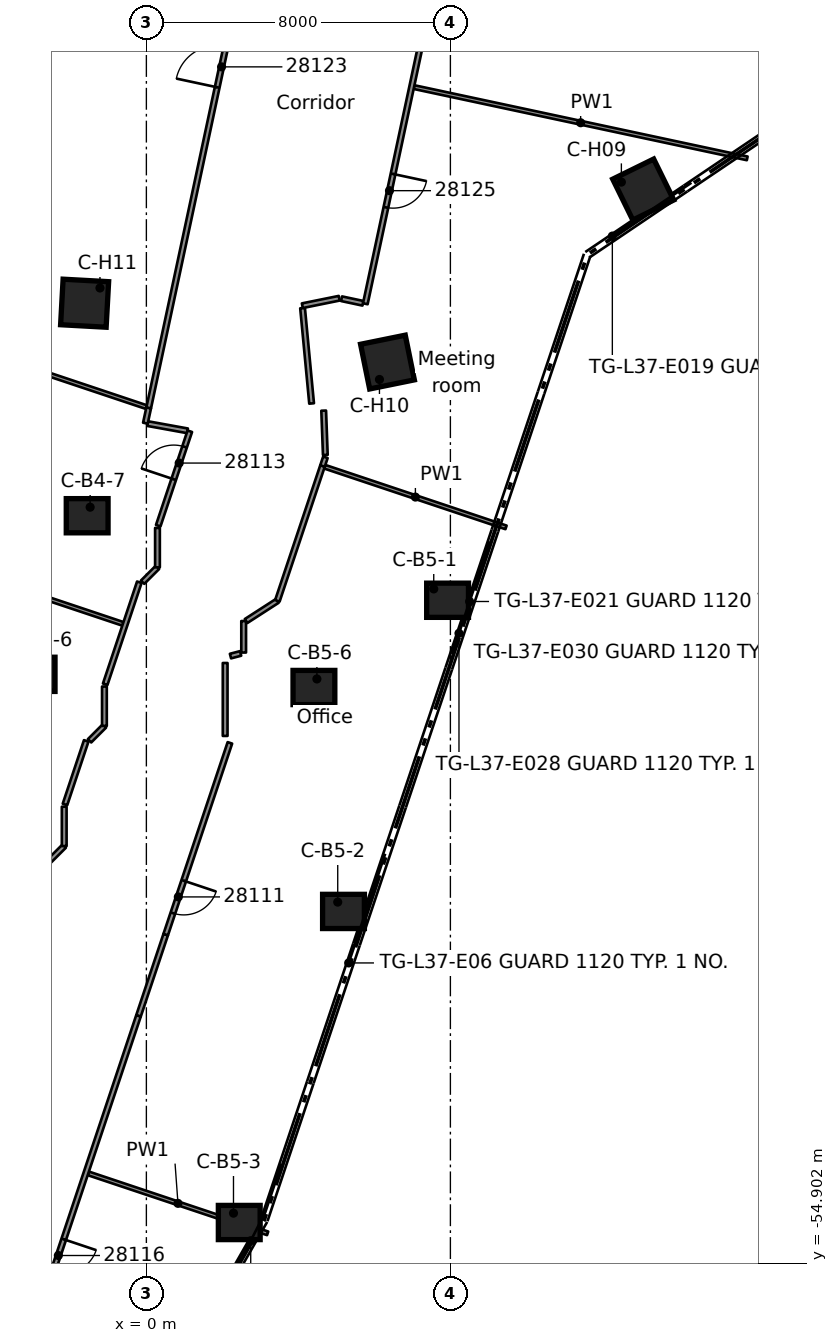
"""IFC4 building model, lengths in metres.
Left out: names, types, materials, properties, quantities, classifications, styles, units other than length and angle.
Written with IfcOpenShell. Run it as: python <this file> out.ifc"""

import sys

from ifc_helpers import new_model, si_unit, direction, frame, frame_2d, origin, origin_2d, place, context, subcontext, project, spatial, rectangle, extrude, element, fill, save


model = new_model("IFC4")
c1 = context("Model", 3, precision=1e-05, world=origin(), true_north=direction((0.0, 1.0)))
c2 = subcontext(c1, "Body", "Model", "MODEL_VIEW")
j1 = project(units=[si_unit("LENGTHUNIT", "METRE"), si_unit("PLANEANGLEUNIT", "RADIAN")], contexts=[c1])
p1 = place(None, origin())
s1 = spatial("IfcSite", under=j1, at=p1, CompositionType="ELEMENT")
p2 = place(p1, origin())
s2 = spatial("IfcBuilding", under=s1, at=p2, CompositionType="ELEMENT")
p3 = place(p2, frame((0.0, 0.0, 145.6)))
s3 = spatial("IfcBuildingStorey", under=s2, at=p3, CompositionType="ELEMENT", Elevation=145.6)
for number, where, z_axis, x_axis in (
    (1, (-2.954, -39.399, 0.0), (0.0, 0.0, 1.0), (1.0, 0.0, 0.0)),
    (2, (-1.558, -35.226, 0.0), (0.0, 0.0, 1.0), (1.0, 0.0, 0.0)),
    (3, (7.926, -37.45, 0.0), (0.0, 0.0, 1.0), (1.0, 0.0, 0.0)),
    (4, (5.187, -45.638, 0.0), (0.0, 0.0, 1.0), (1.0, 0.0, 0.0)),
    (5, (2.444, -53.823, 0.0), (0.0, 0.0, 1.0), (1.0, 0.0, 0.0)),
    (6, (4.409, -39.746, 0.0), (0.0, 0.0, 1.0), (1.0, 0.0, 0.0)),
):
    element("IfcColumn", number, at=place(p3, frame(where, z_axis=z_axis, x_axis=x_axis)), inside=s3, PredefinedType="COLUMN", context=c2, shape_type="SweptSolid", body=[
        extrude(rectangle(XDim=1.1, YDim=0.9, at=origin_2d()), origin(), (0.0, 0.0, 1.0), 3.5),
    ])
for number, where, z_axis, x_axis in (
    (7, (13.075, -26.644, 0.0), (0.0, 0.0, 1.0), (0.441, -0.898, 0.0)),
    (8, (6.344, -31.183, 0.0), (0.0, 0.0, 1.0), (0.199, -0.98, 0.0)),
    (9, (-1.625, -29.634, 0.0), (0.0, 0.0, 1.0), (-0.055, -0.998, 0.0)),
):
    element("IfcColumn", number, at=place(p3, frame(where, z_axis=z_axis, x_axis=x_axis)), inside=s3, PredefinedType="COLUMN", context=c2, shape_type="SweptSolid", body=[
        extrude(rectangle(XDim=1.2, YDim=1.2, at=origin_2d()), origin(), (0.0, 0.0, 1.0), 3.5),
    ])
p4 = place(p3, frame((4.11, -29.762, 0.0), z_axis=(0.0, 0.0, 1.0), x_axis=(0.094315557951, -0.995542352453, 0.0)))
e10 = element("IfcWall", 10, at=p4, inside=s3, PredefinedType="PARTITIONING", context=c2, shape_type="SweptSolid", body=[
    extrude(rectangle(XDim=2.521, YDim=0.125, at=frame_2d((1.261, 0.0))), origin(), (0.0, 0.0, 1.0), 3.08),
])
p5 = place(p3, frame((4.666, -32.461, 0.0), z_axis=(0.0, 0.0, 1.0), x_axis=(0.03682592513, -0.999321695571, 0.0)))
e11 = element("IfcWall", 11, at=p5, inside=s3, PredefinedType="PARTITIONING", context=c2, shape_type="SweptSolid", body=[
    extrude(rectangle(XDim=1.167, YDim=0.125, at=frame_2d((0.583, 0.0))), origin(), (0.0, 0.0, 1.0), 3.08),
])
p6 = place(p3, frame((-1.528, -52.53, 0.0), z_axis=(0.0, 0.0, 1.0), x_axis=(0.948388493502, -0.317110809328, 0.0)))
e12 = element("IfcWall", 12, at=p6, inside=s3, PredefinedType="PARTITIONING", context=c2, shape_type="SweptSolid", body=[
    extrude(rectangle(XDim=4.976, YDim=0.1, at=frame_2d((2.488, 0.0))), origin(), (0.0, 0.0, 1.0), 3.08),
])
p7 = place(p3, frame((-23.366, -30.46, 0.0), z_axis=(0.0, 0.0, 1.0), x_axis=(0.948327494049, -0.317293183083, 0.0)))
e13 = element("IfcWall", 13, at=p7, inside=s3, PredefinedType="PARTITIONING", context=c2, shape_type="SweptSolid", body=[
    extrude(rectangle(XDim=23.988, YDim=0.1, at=frame_2d((11.994, 0.0))), origin(), (0.0, 0.0, 1.0), 3.08),
])
p8 = place(p3, frame((-21.269, -25.25, 0.0), z_axis=(0.0, 0.0, 1.0), x_axis=(0.948309286751, -0.31734759596, 0.0)))
e14 = element("IfcWall", 14, at=p8, inside=s3, PredefinedType="PARTITIONING", context=c2, shape_type="SweptSolid", body=[
    extrude(rectangle(XDim=22.429, YDim=0.1, at=frame_2d((11.215, 0.0))), origin(), (0.0, 0.0, 1.0), 3.08),
])
p9 = place(p3, frame((4.694, -33.937, 0.0), z_axis=(0.0, 0.0, 1.0), x_axis=(0.948328377773, -0.317290541791, 0.0)))
e15 = element("IfcWall", 15, at=p9, inside=s3, PredefinedType="PARTITIONING", context=c2, shape_type="SweptSolid", body=[
    extrude(rectangle(XDim=5.03, YDim=0.1, at=frame_2d((2.515, 0.0))), origin(), (0.0, 0.0, 1.0), 3.08),
])
p10 = place(p3, frame((7.044, -23.948, 0.0), z_axis=(0.0, 0.0, 1.0), x_axis=(0.977886023379, -0.209138531316, 0.0)))
e16 = element("IfcWall", 16, at=p10, inside=s3, PredefinedType="PARTITIONING", context=c2, shape_type="SweptSolid", body=[
    extrude(rectangle(XDim=8.965, YDim=0.1, at=frame_2d((4.483, 0.0))), origin(), (0.0, 0.0, 1.0), 3.08),
])
p11 = place(p3, frame((5.136, -29.516, 0.0), z_axis=(0.0, 0.0, 1.0), x_axis=(0.978074690438, -0.208254411537, 0.0)))
e17 = element("IfcWall", 17, at=p11, inside=s3, PredefinedType="PARTITIONING", context=c2, shape_type="SweptSolid", body=[
    extrude(rectangle(XDim=0.576, YDim=0.125, at=frame_2d((0.288, 0.0))), origin(), (0.0, 0.0, 1.0), 3.08),
])
p12 = place(p3, frame((0.035, -32.802, 0.0), z_axis=(0.0, 0.0, 1.0), x_axis=(0.983943238731, -0.178481659998, 0.0)))
e18 = element("IfcWall", 18, at=p12, inside=s3, PredefinedType="PARTITIONING", context=c2, shape_type="SweptSolid", body=[
    extrude(rectangle(XDim=1.064, YDim=0.125, at=frame_2d((0.532, 0.0))), origin(), (0.0, 0.0, 1.0), 3.08),
])
for number, where, z_axis, x_axis in (
    (19, (-2.553, -44.309, 0.0), (0.0, 0.0, 1.0), (0.707, 0.707, 0.0)),
    (20, (-1.495, -41.148, 0.0), (0.0, 0.0, 1.0), (0.707, 0.707, 0.0)),
):
    element("IfcWall", number, at=place(p3, frame(where, z_axis=z_axis, x_axis=x_axis)), inside=s3, PredefinedType="PARTITIONING", context=c2, shape_type="SweptSolid", body=[
        extrude(rectangle(XDim=0.553, YDim=0.125, at=frame_2d((0.276, 0.0))), origin(), (0.0, 0.0, 1.0), 3.08),
    ])
p13 = place(p3, frame((2.623, -37.997, 0.0), z_axis=(0.0, 0.0, 1.0), x_axis=(0.840117362628, 0.542404661679, 0.0)))
e21 = element("IfcWall", 21, at=p13, inside=s3, PredefinedType="PARTITIONING", context=c2, shape_type="SweptSolid", body=[
    extrude(rectangle(XDim=0.981, YDim=0.125, at=frame_2d((0.49, 0.0))), origin(), (0.0, 0.0, 1.0), 3.08),
])
p14 = place(p3, frame((-0.099, -36.975, 0.0), z_axis=(0.0, 0.0, 1.0), x_axis=(0.707106781187, 0.707106781187, 0.0)))
e22 = element("IfcWall", 22, at=p14, inside=s3, PredefinedType="PARTITIONING", context=c2, shape_type="SweptSolid", body=[
    extrude(rectangle(XDim=0.553, YDim=0.125, at=frame_2d((0.277, 0.0))), origin(), (0.0, 0.0, 1.0), 3.08),
])
p15 = place(p3, frame((4.104, -29.7, 0.0), z_axis=(0.0, 0.0, 1.0), x_axis=(0.980027109115, 0.198863936901, 0.0)))
e23 = element("IfcWall", 23, at=p15, inside=s3, PredefinedType="PARTITIONING", context=c2, shape_type="SweptSolid", body=[
    extrude(rectangle(XDim=0.991, YDim=0.125, at=frame_2d((0.495, 0.0))), origin(), (0.0, 0.0, 1.0), 3.08),
])
p16 = place(p3, frame((2.213, -38.919, 0.0), z_axis=(0.0, 0.0, 1.0), x_axis=(0.967485661633, 0.252925867666, 0.0)))
e24 = element("IfcWall", 24, at=p16, inside=s3, PredefinedType="PARTITIONING", context=c2, shape_type="SweptSolid", body=[
    extrude(rectangle(XDim=0.276, YDim=0.125, at=frame_2d((0.138, 0.0))), origin(), (0.0, 0.0, 1.0), 3.08),
])
p17 = place(p3, frame((-0.207, -48.385, 0.0), z_axis=(0.0, 0.0, 1.0), x_axis=(0.317591795151, 0.948227531584, 0.0)))
e25 = element("IfcWall", 25, at=p17, inside=s3, PredefinedType="PARTITIONING", context=c2, shape_type="SweptSolid", body=[
    extrude(rectangle(XDim=2.255, YDim=0.125, at=frame_2d((1.127, 0.0))), origin(), (0.0, 0.0, 1.0), 3.08),
])
p18 = place(p3, frame((3.447, -37.465, 0.0), z_axis=(0.0, 0.0, 1.0), x_axis=(0.31749982988, 0.948258328741, 0.0)))
e26 = element("IfcWall", 26, at=p18, inside=s3, PredefinedType="PARTITIONING", context=c2, shape_type="SweptSolid", body=[
    extrude(rectangle(XDim=3.742, YDim=0.125, at=frame_2d((1.871, 0.0))), origin(), (0.0, 0.0, 1.0), 3.08),
])
p19 = place(p3, frame((-0.208, -48.388, 0.0), z_axis=(0.0, 0.0, 1.0), x_axis=(-0.317280583106, -0.94833170968, 0.0)))
e27 = element("IfcWall", 27, at=p19, inside=s3, PredefinedType="PARTITIONING", context=c2, shape_type="SweptSolid", body=[
    extrude(rectangle(XDim=9.042, YDim=0.125, at=frame_2d((4.521, 0.0))), origin(), (0.0, 0.0, 1.0), 3.08),
])
p20 = place(p19, frame((6.197, 0.0, 0.0)))
e28 = element("IfcOpeningElement", 28, at=p20, cuts=e27, PredefinedType="OPENING", context=c2, shape_type="SweptSolid", body=[
    extrude(rectangle(XDim=0.9, YDim=2.1, at=frame_2d((0.45, 1.05))), frame((0.0, 0.073, 0.0), z_axis=(0.0, -1.0, 0.0), x_axis=(1.0, 0.0, 0.0)), (0.0, 0.0, 1.0), 0.145),
])
p21 = place(p3, frame((2.198, -41.202, 0.0), z_axis=(0.0, 0.0, 1.0), x_axis=(-0.317452710065, -0.948274104293, 0.0)))
e29 = element("IfcWall", 29, at=p21, inside=s3, PredefinedType="PARTITIONING", context=c2, shape_type="SweptSolid", body=[
    extrude(rectangle(XDim=5.32, YDim=0.125, at=frame_2d((2.66, 0.0))), origin(), (0.0, 0.0, 1.0), 3.08),
])
p22 = place(p21, frame((3.825, 0.0, 0.0)))
e30 = element("IfcOpeningElement", 30, at=p22, cuts=e29, PredefinedType="OPENING", context=c2, shape_type="SweptSolid", body=[
    extrude(rectangle(XDim=0.9, YDim=2.1, at=frame_2d((0.45, 1.05))), frame((0.0, 0.073, 0.0), z_axis=(0.0, -1.0, 0.0), x_axis=(1.0, 0.0, 0.0)), (0.0, 0.0, 1.0), 0.145),
])
p23 = place(p3, frame((-2.142, -42.823, 0.0), z_axis=(0.0, 0.0, 1.0), x_axis=(0.316933512953, 0.948447757321, 0.0)))
e31 = element("IfcWall", 31, at=p23, inside=s3, PredefinedType="PARTITIONING", context=c2, shape_type="SweptSolid", body=[
    extrude(rectangle(XDim=1.764, YDim=0.125, at=frame_2d((0.882, 0.0))), origin(), (0.0, 0.0, 1.0), 3.08),
])
p24 = place(p3, frame((-1.084, -39.661, 0.0), z_axis=(0.0, 0.0, 1.0), x_axis=(0.317184851324, 0.948363733011, 0.0)))
e32 = element("IfcWall", 32, at=p24, inside=s3, PredefinedType="PARTITIONING", context=c2, shape_type="SweptSolid", body=[
    extrude(rectangle(XDim=2.831, YDim=0.125, at=frame_2d((1.416, 0.0))), origin(), (0.0, 0.0, 1.0), 3.08),
])
p25 = place(p3, frame((0.312, -35.488, 0.0), z_axis=(0.0, 0.0, 1.0), x_axis=(0.317149997564, 0.948375389308, 0.0)))
e33 = element("IfcWall", 33, at=p25, inside=s3, PredefinedType="PARTITIONING", context=c2, shape_type="SweptSolid", body=[
    extrude(rectangle(XDim=2.62, YDim=0.125, at=frame_2d((1.31, 0.0))), origin(), (0.0, 0.0, 1.0), 3.08),
])
p26 = place(p25, frame((1.288, 0.0, 0.0)))
e34 = element("IfcOpeningElement", 34, at=p26, cuts=e33, PredefinedType="OPENING", context=c2, shape_type="SweptSolid", body=[
    extrude(rectangle(XDim=0.9, YDim=2.1, at=frame_2d((0.45, 1.05))), frame((0.0, 0.073, 0.0), z_axis=(0.0, -1.0, 0.0), x_axis=(1.0, 0.0, 0.0)), (0.0, 0.0, 1.0), 0.145),
])
p27 = place(p3, frame((4.635, -33.917, 0.0), z_axis=(0.0, 0.0, 1.0), x_axis=(0.315923000826, 0.948784832061, 0.0)))
e35 = element("IfcWall", 35, at=p27, inside=s3, PredefinedType="PARTITIONING", context=c2, shape_type="SweptSolid", body=[
    extrude(rectangle(XDim=0.24, YDim=0.125, at=frame_2d((0.12, 0.0))), origin(), (0.0, 0.0, 1.0), 3.08),
])
p28 = place(p3, frame((-0.026, -32.791, 0.0), z_axis=(0.0, 0.0, 1.0), x_axis=(0.210295516646, 0.977637865305, 0.0)))
e36 = element("IfcWall", 36, at=p28, inside=s3, PredefinedType="PARTITIONING", context=c2, shape_type="SweptSolid", body=[
    extrude(rectangle(XDim=0.413, YDim=0.125, at=frame_2d((0.207, 0.0))), origin(), (0.0, 0.0, 1.0), 3.08),
])
p29 = place(p3, frame((9.022, -14.399, 0.0), z_axis=(0.0, 0.0, 1.0), x_axis=(-0.209107827196, -0.977892589503, 0.0)))
e37 = element("IfcWall", 37, at=p29, inside=s3, PredefinedType="PARTITIONING", context=c2, shape_type="SweptSolid", body=[
    extrude(rectangle(XDim=15.595, YDim=0.125, at=frame_2d((7.797, 0.0))), origin(), (0.0, 0.0, 1.0), 3.08),
])
p30 = place(p29, frame((12.101, 0.0, 0.0)))
e38 = element("IfcOpeningElement", 38, at=p30, cuts=e37, PredefinedType="OPENING", context=c2, shape_type="SweptSolid", body=[
    extrude(rectangle(XDim=0.9, YDim=2.1, at=frame_2d((0.45, 1.05))), frame((0.0, 0.073, 0.0), z_axis=(0.0, -1.0, 0.0), x_axis=(1.0, 0.0, 0.0)), (0.0, 0.0, 1.0), 0.145),
])
p31 = place(p3, frame((0.061, -32.387, 0.0), z_axis=(0.0, 0.0, 1.0), x_axis=(0.209029624493, 0.977909308721, 0.0)))
e39 = element("IfcWall", 39, at=p31, inside=s3, PredefinedType="PARTITIONING", context=c2, shape_type="SweptSolid", body=[
    extrude(rectangle(XDim=18.394, YDim=0.125, at=frame_2d((9.197, 0.0))), origin(), (0.0, 0.0, 1.0), 3.08),
])
p32 = place(p31, frame((8.624, 0.0, 0.0)))
e40 = element("IfcOpeningElement", 40, at=p32, cuts=e39, PredefinedType="OPENING", context=c2, shape_type="SweptSolid", body=[
    extrude(rectangle(XDim=1.1, YDim=2.1, at=frame_2d((0.55, 1.05))), frame((0.0, 0.073, 0.0), z_axis=(0.0, -1.0, 0.0), x_axis=(1.0, 0.0, 0.0)), (0.0, 0.0, 1.0), 0.145),
])
p33 = place(p31, frame((16.404, 0.0, 0.0)))
e41 = element("IfcOpeningElement", 41, at=p33, cuts=e39, PredefinedType="OPENING", context=c2, shape_type="SweptSolid", body=[
    extrude(rectangle(XDim=1.1, YDim=2.1, at=frame_2d((0.55, 1.05))), frame((0.0, 0.073, 0.0), z_axis=(0.0, -1.0, 0.0), x_axis=(1.0, 0.0, 0.0)), (0.0, 0.0, 1.0), 0.145),
])
p34 = place(p3, frame((2.56, -38.826, 0.0), z_axis=(0.0, 0.0, 1.0), x_axis=(0.0, 1.0, 0.0)))
e42 = element("IfcWall", 42, at=p34, inside=s3, PredefinedType="PARTITIONING", context=c2, shape_type="SweptSolid", body=[
    extrude(rectangle(XDim=0.829, YDim=0.125, at=frame_2d((0.415, 0.0))), origin(), (0.0, 0.0, 1.0), 3.08),
])
p35 = place(p3, frame((2.073, -41.02, 0.0), z_axis=(0.0, 0.0, 1.0), x_axis=(0.0, 1.0, 0.0)))
e43 = element("IfcWall", 43, at=p35, inside=s3, PredefinedType="PARTITIONING", context=c2, shape_type="SweptSolid", body=[
    extrude(rectangle(XDim=1.919, YDim=0.125, at=frame_2d((0.959, 0.0))), origin(), (0.0, 0.0, 1.0), 3.08),
])
p36 = place(p3, frame((0.292, -36.584, 0.0), z_axis=(0.0, 0.0, 1.0), x_axis=(0.0, 1.0, 0.0)))
e44 = element("IfcWall", 44, at=p36, inside=s3, PredefinedType="PARTITIONING", context=c2, shape_type="SweptSolid", body=[
    extrude(rectangle(XDim=1.037, YDim=0.125, at=frame_2d((0.519, 0.0))), origin(), (0.0, 0.0, 1.0), 3.08),
])
p37 = place(p3, frame((-1.104, -40.757, 0.0), z_axis=(0.0, 0.0, 1.0), x_axis=(0.0, 1.0, 0.0)))
e45 = element("IfcWall", 45, at=p37, inside=s3, PredefinedType="PARTITIONING", context=c2, shape_type="SweptSolid", body=[
    extrude(rectangle(XDim=1.037, YDim=0.125, at=frame_2d((0.519, 0.0))), origin(), (0.0, 0.0, 1.0), 3.08),
])
p38 = place(p3, frame((-2.162, -43.918, 0.0), z_axis=(0.0, 0.0, 1.0), x_axis=(0.0, 1.0, 0.0)))
e46 = element("IfcWall", 46, at=p38, inside=s3, PredefinedType="PARTITIONING", context=c2, shape_type="SweptSolid", body=[
    extrude(rectangle(XDim=1.036, YDim=0.125, at=frame_2d((0.518, 0.0))), origin(), (0.0, 0.0, 1.0), 3.08),
])
p39 = place(p22, origin())
e47 = element("IfcDoor", 47, at=p39, inside=s3, OperationType="SINGLE_SWING_RIGHT", PredefinedType="DOOR", context=c2, shape_type="SweptSolid", body=[
    extrude(rectangle(XDim=0.9, YDim=2.1, at=frame_2d((0.45, 1.05))), frame((0.0, 0.025, 0.0), z_axis=(0.0, -1.0, 0.0), x_axis=(1.0, 0.0, 0.0)), (0.0, 0.0, 1.0), 0.05),
])
fill(e30, e47)
p40 = place(p26, origin())
e48 = element("IfcDoor", 48, at=p40, inside=s3, OperationType="SINGLE_SWING_RIGHT", PredefinedType="DOOR", context=c2, shape_type="SweptSolid", body=[
    extrude(rectangle(XDim=0.9, YDim=2.1, at=frame_2d((0.45, 1.05))), frame((0.0, 0.025, 0.0), z_axis=(0.0, -1.0, 0.0), x_axis=(1.0, 0.0, 0.0)), (0.0, 0.0, 1.0), 0.05),
])
fill(e34, e48)
p41 = place(p20, origin())
e49 = element("IfcDoor", 49, at=p41, inside=s3, OperationType="SINGLE_SWING_RIGHT", PredefinedType="DOOR", context=c2, shape_type="SweptSolid", body=[
    extrude(rectangle(XDim=0.9, YDim=2.1, at=frame_2d((0.45, 1.05))), frame((0.0, 0.025, 0.0), z_axis=(0.0, -1.0, 0.0), x_axis=(1.0, 0.0, 0.0)), (0.0, 0.0, 1.0), 0.05),
])
fill(e28, e49)
p42 = place(p32, origin())
e50 = element("IfcDoor", 50, at=p42, inside=s3, OperationType="SINGLE_SWING_LEFT", PredefinedType="DOOR", context=c2, shape_type="SweptSolid", body=[
    extrude(rectangle(XDim=1.1, YDim=2.1, at=frame_2d((0.55, 1.05))), frame((0.0, 0.025, 0.0), z_axis=(0.0, -1.0, 0.0), x_axis=(1.0, 0.0, 0.0)), (0.0, 0.0, 1.0), 0.05),
])
fill(e40, e50)
p43 = place(p30, origin())
e51 = element("IfcDoor", 51, at=p43, inside=s3, OperationType="SINGLE_SWING_RIGHT", PredefinedType="DOOR", context=c2, shape_type="SweptSolid", body=[
    extrude(rectangle(XDim=0.9, YDim=2.1, at=frame_2d((0.45, 1.05))), frame((0.0, 0.025, 0.0), z_axis=(0.0, -1.0, 0.0), x_axis=(1.0, 0.0, 0.0)), (0.0, 0.0, 1.0), 0.05),
])
fill(e38, e51)
save(model, sys.argv[1])
